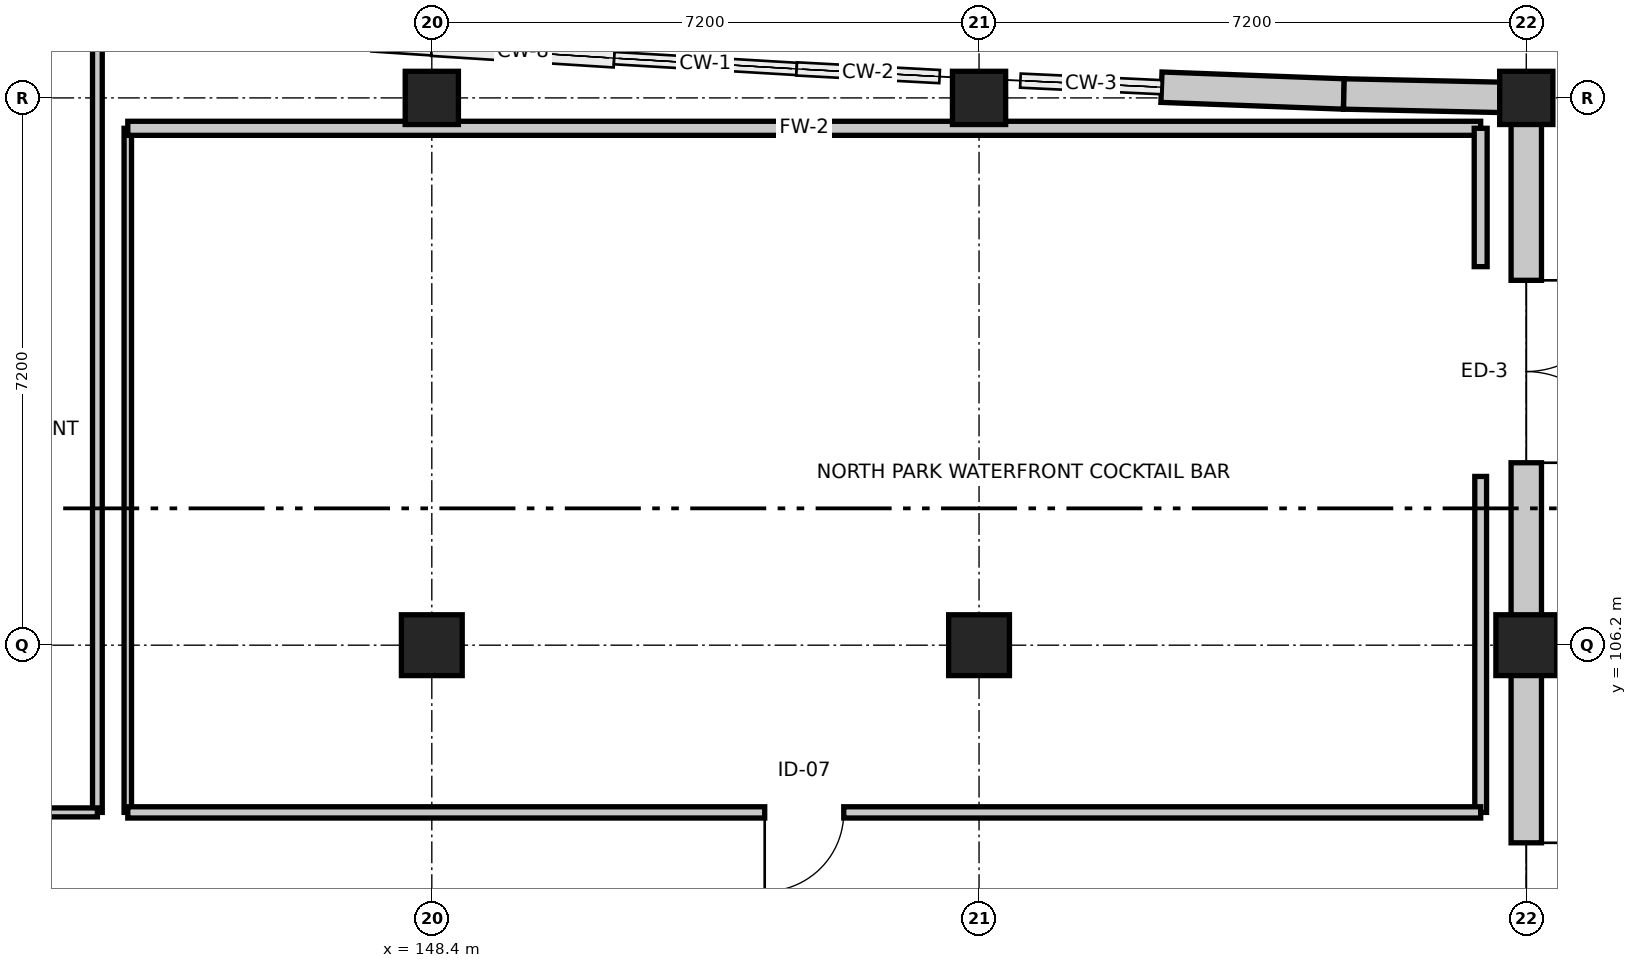
"""IFC4 building model, lengths in metres.
Left out: names, types, materials, properties, quantities, classifications, styles, units other than length and angle.
Written with IfcOpenShell. Run it as: python <this file> out.ifc"""

import sys

from ifc_helpers import new_model, si_unit, direction, frame, frame_2d, origin, origin_2d, place, context, subcontext, project, spatial, rectangle, extrude, element, fill, save


model = new_model("IFC4")
c1 = context("Model", 3, precision=1e-05, world=origin(), true_north=direction((0.0, 1.0)))
c2 = subcontext(c1, "Body", "Model", "MODEL_VIEW")
j1 = project(units=[si_unit("LENGTHUNIT", "METRE"), si_unit("PLANEANGLEUNIT", "RADIAN")], contexts=[c1])
p1 = place(None, origin())
s1 = spatial("IfcSite", under=j1, at=p1, CompositionType="ELEMENT")
p2 = place(p1, origin())
s2 = spatial("IfcBuilding", under=s1, at=p2, CompositionType="ELEMENT")
p3 = place(p2, origin())
s3 = spatial("IfcBuildingStorey", under=s2, at=p3, CompositionType="ELEMENT", Elevation=0.0)
p4 = place(p3, frame((148.4, 106.2, 0.0), z_axis=(0.0, 0.0, 1.0), x_axis=(1.0, 0.0, 0.0)))
e1 = element("IfcColumn", 1, at=p4, inside=s3, PredefinedType="COLUMN", context=c2, shape_type="SweptSolid", body=[
    extrude(rectangle(XDim=0.8, YDim=0.8, at=origin_2d()), origin(), (0.0, 0.0, 1.0), 5.4),
])
p5 = place(p3, frame((148.4, 113.4, 0.0), z_axis=(0.0, 0.0, 1.0), x_axis=(1.0, 0.0, 0.0)))
e2 = element("IfcColumn", 2, at=p5, inside=s3, PredefinedType="COLUMN", context=c2, shape_type="SweptSolid", body=[
    extrude(rectangle(XDim=0.7, YDim=0.7, at=origin_2d()), origin(), (0.0, 0.0, 1.0), 5.4),
])
p6 = place(p3, frame((155.6, 106.2, 0.0), z_axis=(0.0, 0.0, 1.0), x_axis=(1.0, 0.0, 0.0)))
e3 = element("IfcColumn", 3, at=p6, inside=s3, PredefinedType="COLUMN", context=c2, shape_type="SweptSolid", body=[
    extrude(rectangle(XDim=0.8, YDim=0.8, at=origin_2d()), origin(), (0.0, 0.0, 1.0), 5.4),
])
p7 = place(p3, frame((155.6, 113.4, 0.0), z_axis=(0.0, 0.0, 1.0), x_axis=(1.0, 0.0, 0.0)))
e4 = element("IfcColumn", 4, at=p7, inside=s3, PredefinedType="COLUMN", context=c2, shape_type="SweptSolid", body=[
    extrude(rectangle(XDim=0.7, YDim=0.7, at=origin_2d()), origin(), (0.0, 0.0, 1.0), 5.4),
])
p8 = place(p3, frame((162.8, 106.2, 0.0), z_axis=(0.0, 0.0, 1.0), x_axis=(1.0, 0.0, 0.0)))
e5 = element("IfcColumn", 5, at=p8, inside=s3, PredefinedType="COLUMN", context=c2, shape_type="SweptSolid", body=[
    extrude(rectangle(XDim=0.8, YDim=0.8, at=origin_2d()), origin(), (0.0, 0.0, 1.0), 5.4),
])
p9 = place(p3, frame((162.8, 113.4, 0.0), z_axis=(0.0, 0.0, 1.0), x_axis=(1.0, 0.0, 0.0)))
e6 = element("IfcColumn", 6, at=p9, inside=s3, PredefinedType="COLUMN", context=c2, shape_type="SweptSolid", body=[
    extrude(rectangle(XDim=0.7, YDim=0.7, at=origin_2d()), origin(), (0.0, 0.0, 1.0), 5.4),
])
p10 = place(p3, frame((158.0, 113.541, 0.0), z_axis=(0.0, 0.0, 1.0), x_axis=(0.99930757318, -0.037207179225, 0.0)))
e7 = element("IfcWall", 7, at=p10, inside=s3, PredefinedType="STANDARD", context=c2, shape_type="SweptSolid", body=[
    extrude(rectangle(XDim=2.402, YDim=0.4, at=frame_2d((1.201, 0.0))), origin(), (0.0, 0.0, 1.0), 4.335),
])
p11 = place(p3, frame((160.4, 113.452, 0.0), z_axis=(0.0, 0.0, 1.0), x_axis=(0.999767568547, -0.021559426766, 0.0)))
e8 = element("IfcWall", 8, at=p11, inside=s3, PredefinedType="STANDARD", context=c2, shape_type="SweptSolid", body=[
    extrude(rectangle(XDim=2.401, YDim=0.4, at=frame_2d((1.2, 0.0))), origin(), (0.0, 0.0, 1.0), 4.335),
])
p12 = place(p3, frame((162.8, 113.4, 0.0), z_axis=(0.0, 0.0, 1.0), x_axis=(0.0, -1.0, 0.0)))
e9 = element("IfcWall", 9, at=p12, inside=s3, PredefinedType="STANDARD", context=c2, shape_type="SweptSolid", body=[
    extrude(rectangle(XDim=7.2, YDim=0.4, at=frame_2d((3.6, 0.0))), origin(), (0.0, 0.0, 1.0), 4.235),
])
p13 = place(p12, frame((2.4, 0.0, 0.0)))
e10 = element("IfcOpeningElement", 10, at=p13, cuts=e9, PredefinedType="OPENING", context=c2, shape_type="SweptSolid", body=[
    extrude(rectangle(XDim=2.4, YDim=2.4, at=frame_2d((1.2, 1.2))), frame((0.0, 0.21, 0.0), z_axis=(0.0, -1.0, 0.0), x_axis=(1.0, 0.0, 0.0)), (0.0, 0.0, 1.0), 0.42),
])
p14 = place(p3, frame((162.8, 106.2, 0.0), z_axis=(0.0, 0.0, 1.0), x_axis=(0.0, -1.0, 0.0)))
e11 = element("IfcWall", 11, at=p14, inside=s3, PredefinedType="STANDARD", context=c2, shape_type="SweptSolid", body=[
    extrude(rectangle(XDim=7.2, YDim=0.4, at=frame_2d((3.6, 0.0))), origin(), (0.0, 0.0, 1.0), 4.235),
])
p15 = place(p14, frame((2.6, 0.0, 0.0)))
e12 = element("IfcOpeningElement", 12, at=p15, cuts=e11, PredefinedType="OPENING", context=c2, shape_type="SweptSolid", body=[
    extrude(rectangle(XDim=2.0, YDim=2.2, at=frame_2d((1.0, 1.1))), frame((0.0, 0.21, 0.0), z_axis=(0.0, -1.0, 0.0), x_axis=(1.0, 0.0, 0.0)), (0.0, 0.0, 1.0), 0.42),
])
p16 = place(p3, frame((144.0, 114.374, 0.0), z_axis=(0.0, 0.0, 1.0), x_axis=(0.0, -1.0, 0.0)))
e13 = element("IfcWall", 13, at=p16, inside=s3, PredefinedType="PARTITIONING", context=c2, shape_type="SweptSolid", body=[
    extrude(rectangle(XDim=10.374, YDim=0.128, at=frame_2d((5.187, 0.0))), origin(), (0.0, 0.0, 1.0), 4.335),
])
p17 = place(p3, frame((144.0, 104.0, 0.0), z_axis=(0.0, 0.0, 1.0), x_axis=(-1.0, 0.0, 0.0)))
e14 = element("IfcWall", 14, at=p17, inside=s3, PredefinedType="PARTITIONING", context=c2, shape_type="SweptSolid", body=[
    extrude(rectangle(XDim=31.6, YDim=0.118, at=frame_2d((15.8, 0.0))), origin(), (0.0, 0.0, 1.0), 4.235),
])
p18 = place(p17, frame((15.3, 0.0, 0.0)))
e15 = element("IfcOpeningElement", 15, at=p18, cuts=e14, PredefinedType="OPENING", context=c2, shape_type="SweptSolid", body=[
    extrude(rectangle(XDim=1.0, YDim=2.1, at=frame_2d((0.5, 1.05))), frame((0.0, 0.069, 0.0), z_axis=(0.0, -1.0, 0.0), x_axis=(1.0, 0.0, 0.0)), (0.0, 0.0, 1.0), 0.138),
])
p19 = place(p3, frame((144.4, 104.0, 0.0), z_axis=(0.0, 0.0, 1.0), x_axis=(0.0, 1.0, 0.0)))
e16 = element("IfcWall", 16, at=p19, inside=s3, PredefinedType="PARTITIONING", context=c2, shape_type="SweptSolid", body=[
    extrude(rectangle(XDim=9.0, YDim=0.098, at=frame_2d((4.5, 0.0))), origin(), (0.0, 0.0, 1.0), 4.335),
])
p20 = place(p3, frame((144.4, 113.0, 0.0), z_axis=(0.0, 0.0, 1.0), x_axis=(1.0, 0.0, 0.0)))
e17 = element("IfcWall", 17, at=p20, inside=s3, PredefinedType="PARTITIONING", context=c2, shape_type="SweptSolid", body=[
    extrude(rectangle(XDim=17.8, YDim=0.185, at=frame_2d((8.9, 0.0))), origin(), (0.0, 0.0, 1.0), 4.235),
])
p21 = place(p3, frame((162.2, 113.0, 0.0), z_axis=(0.0, 0.0, 1.0), x_axis=(0.0, -1.0, 0.0)))
e18 = element("IfcWall", 18, at=p21, inside=s3, PredefinedType="PARTITIONING", context=c2, shape_type="SweptSolid", body=[
    extrude(rectangle(XDim=1.82, YDim=0.17, at=frame_2d((0.91, 0.0))), origin(), (0.0, 0.0, 1.0), 5.1),
])
p22 = place(p3, frame((162.2, 108.42, 0.0), z_axis=(0.0, 0.0, 1.0), x_axis=(0.0, -1.0, 0.0)))
e19 = element("IfcWall", 19, at=p22, inside=s3, PredefinedType="PARTITIONING", context=c2, shape_type="SweptSolid", body=[
    extrude(rectangle(XDim=4.42, YDim=0.155, at=frame_2d((2.21, 0.0))), origin(), (0.0, 0.0, 1.0), 4.335),
])
p23 = place(p3, frame((162.2, 104.0, 0.0), z_axis=(0.0, 0.0, 1.0), x_axis=(-1.0, 0.0, 0.0)))
e20 = element("IfcWall", 20, at=p23, inside=s3, PredefinedType="PARTITIONING", context=c2, shape_type="SweptSolid", body=[
    extrude(rectangle(XDim=17.8, YDim=0.148, at=frame_2d((8.9, 0.0))), origin(), (0.0, 0.0, 1.0), 4.235),
])
p24 = place(p23, frame((8.38, 0.0, 0.0)))
e21 = element("IfcOpeningElement", 21, at=p24, cuts=e20, PredefinedType="OPENING", context=c2, shape_type="SweptSolid", body=[
    extrude(rectangle(XDim=1.04, YDim=2.12, at=frame_2d((0.52, 1.06))), frame((0.0, 0.084, 0.0), z_axis=(0.0, -1.0, 0.0), x_axis=(1.0, 0.0, 0.0)), (0.0, 0.0, 1.0), 0.168),
])
p25 = place(p13, origin())
e22 = element("IfcDoor", 22, at=p25, inside=s3, OperationType="DOUBLE_DOOR_SINGLE_SWING", PredefinedType="DOOR", context=c2, shape_type="SweptSolid", body=[
    extrude(rectangle(XDim=2.4, YDim=2.4, at=frame_2d((1.2, 1.2))), frame((0.0, 0.025, 0.0), z_axis=(0.0, -1.0, 0.0), x_axis=(1.0, 0.0, 0.0)), (0.0, 0.0, 1.0), 0.05),
])
fill(e10, e22)
p26 = place(p15, origin())
e23 = element("IfcDoor", 23, at=p26, inside=s3, OperationType="DOUBLE_DOOR_SINGLE_SWING", PredefinedType="DOOR", context=c2, shape_type="SweptSolid", body=[
    extrude(rectangle(XDim=2.0, YDim=2.2, at=frame_2d((1.0, 1.1))), frame((0.0, 0.025, 0.0), z_axis=(0.0, -1.0, 0.0), x_axis=(1.0, 0.0, 0.0)), (0.0, 0.0, 1.0), 0.05),
])
fill(e12, e23)
p27 = place(p24, origin())
e24 = element("IfcDoor", 24, at=p27, inside=s3, OperationType="SINGLE_SWING_RIGHT", PredefinedType="DOOR", context=c2, shape_type="SweptSolid", body=[
    extrude(rectangle(XDim=1.04, YDim=2.12, at=frame_2d((0.52, 1.06))), frame((0.0, 0.025, 0.0), z_axis=(0.0, -1.0, 0.0), x_axis=(1.0, 0.0, 0.0)), (0.0, 0.0, 1.0), 0.05),
])
fill(e21, e24)
save(model, sys.argv[1])
